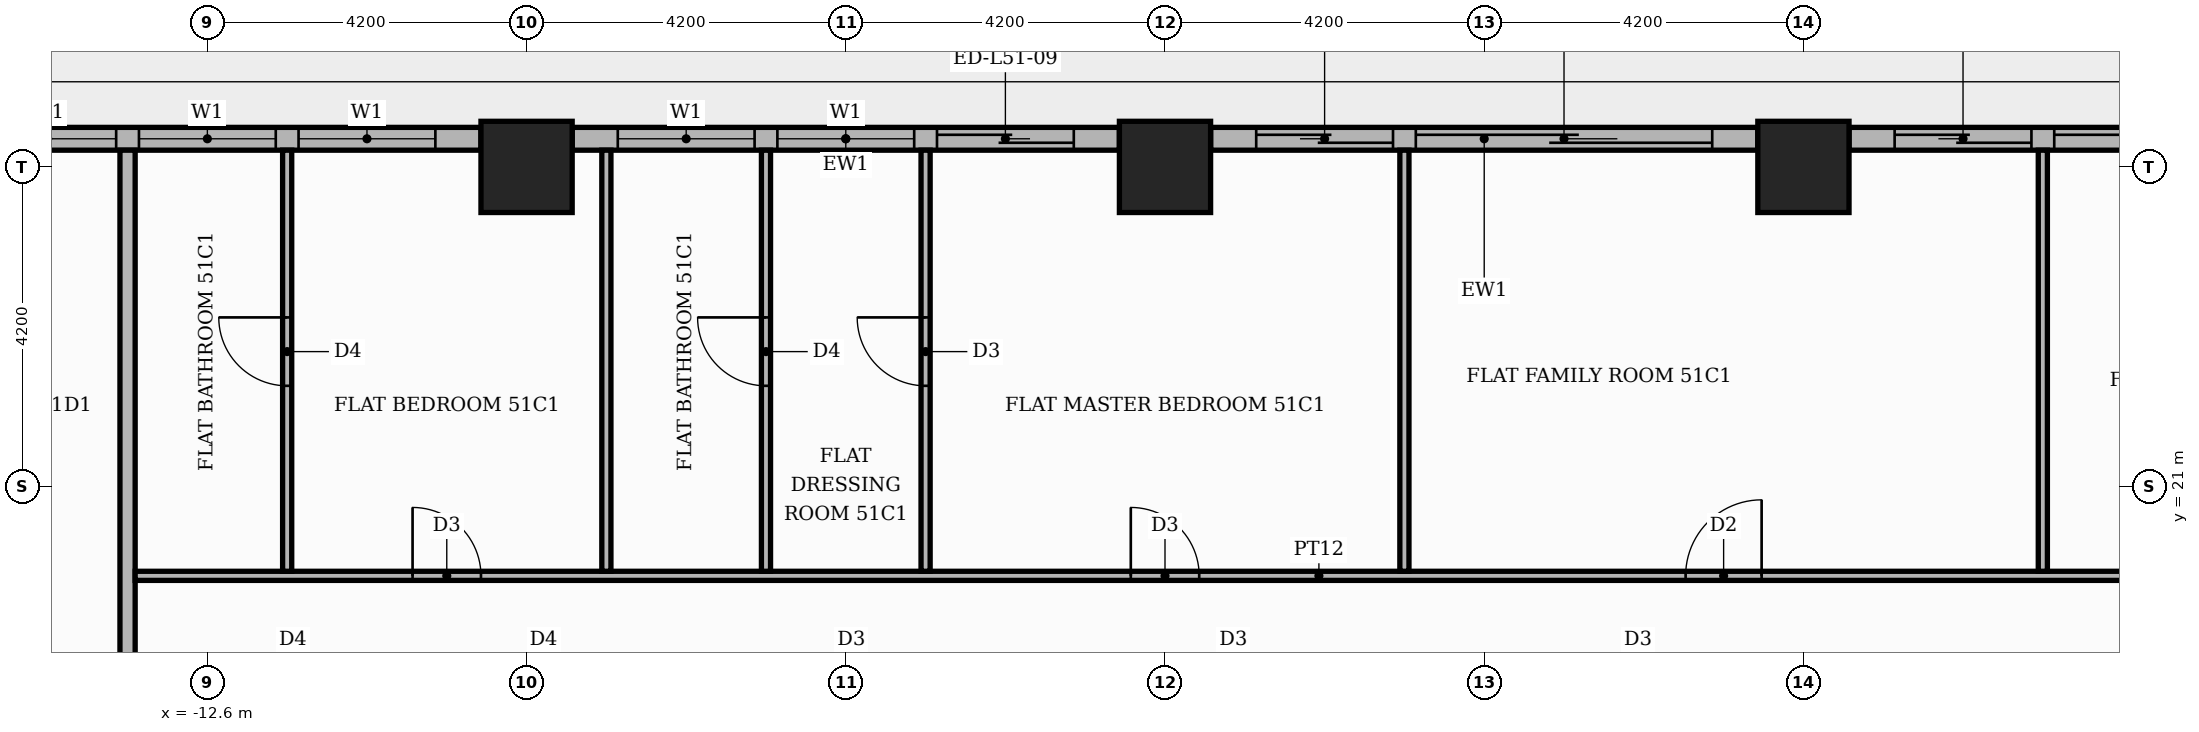
"""IFC4 building model, lengths in metres.
Left out: names, types, materials, properties, quantities, classifications, styles, units other than length and angle.
Written with IfcOpenShell. Run it as: python <this file> out.ifc"""

import sys

from ifc_helpers import new_model, si_unit, direction, frame, frame_2d, origin, origin_2d, place, context, subcontext, project, spatial, rectangle, extrude, element, fill, save


model = new_model("IFC4")
c1 = context("Model", 3, precision=1e-05, world=origin(), true_north=direction((0.0, 1.0)))
c2 = subcontext(c1, "Body", "Model", "MODEL_VIEW")
j1 = project(units=[si_unit("LENGTHUNIT", "METRE"), si_unit("PLANEANGLEUNIT", "RADIAN")], contexts=[c1])
p1 = place(None, origin())
s1 = spatial("IfcSite", under=j1, at=p1, CompositionType="ELEMENT")
p2 = place(p1, origin())
s2 = spatial("IfcBuilding", under=s1, at=p2, CompositionType="ELEMENT")
p3 = place(p2, frame((0.0, 0.0, 215.7)))
s3 = spatial("IfcBuildingStorey", under=s2, at=p3, CompositionType="ELEMENT", Elevation=215.7)
for number, where, z_axis, x_axis in (
    (1, (0.0, 25.2, 0.0), (0.0, 0.0, 1.0), (1.0, 0.0, 0.0)),
    (2, (-8.4, 25.2, 0.0), (0.0, 0.0, 1.0), (1.0, 0.0, 0.0)),
    (3, (8.4, 25.2, 0.0), (0.0, 0.0, 1.0), (1.0, 0.0, 0.0)),
):
    element("IfcColumn", number, at=place(p3, frame(where, z_axis=z_axis, x_axis=x_axis)), inside=s3, PredefinedType="COLUMN", context=c2, shape_type="SweptSolid", body=[
        extrude(rectangle(XDim=1.2, YDim=1.2, at=origin_2d()), origin(), (0.0, 0.0, 1.0), 3.9),
    ])
p4 = place(p3, frame((16.2, 25.57, 0.0), z_axis=(0.0, 0.0, 1.0), x_axis=(-1.0, 0.0, 0.0)))
e4 = element("IfcWall", 4, at=p4, inside=s3, PredefinedType="STANDARD", context=c2, shape_type="SweptSolid", body=[
    extrude(rectangle(XDim=7.2, YDim=0.3, at=frame_2d((3.6, 0.0))), origin(), (0.0, 0.0, 1.0), 3.48),
])
p5 = place(p4, frame((0.6, 0.0, 0.0)))
e5 = element("IfcOpeningElement", 5, at=p5, cuts=e4, PredefinedType="OPENING", context=c2, shape_type="SweptSolid", body=[
    extrude(rectangle(XDim=3.9, YDim=2.4, at=frame_2d((1.95, 1.2))), frame((0.0, 0.16, 0.0), z_axis=(0.0, -1.0, 0.0), x_axis=(1.0, 0.0, 0.0)), (0.0, 0.0, 1.0), 0.32),
])
p6 = place(p4, frame((4.8, 0.0, 0.0)))
e6 = element("IfcOpeningElement", 6, at=p6, cuts=e4, PredefinedType="OPENING", context=c2, shape_type="SweptSolid", body=[
    extrude(rectangle(XDim=1.8, YDim=2.4, at=frame_2d((0.9, 1.2))), frame((0.0, 0.16, 0.0), z_axis=(0.0, -1.0, 0.0), x_axis=(1.0, 0.0, 0.0)), (0.0, 0.0, 1.0), 0.32),
])
p7 = place(p3, frame((7.8, 25.57, 0.0), z_axis=(0.0, 0.0, 1.0), x_axis=(-1.0, 0.0, 0.0)))
e7 = element("IfcWall", 7, at=p7, inside=s3, PredefinedType="STANDARD", context=c2, shape_type="SweptSolid", body=[
    extrude(rectangle(XDim=7.2, YDim=0.3, at=frame_2d((3.6, 0.0))), origin(), (0.0, 0.0, 1.0), 3.48),
])
p8 = place(p7, frame((0.6, 0.0, 0.0)))
e8 = element("IfcOpeningElement", 8, at=p8, cuts=e7, PredefinedType="OPENING", context=c2, shape_type="SweptSolid", body=[
    extrude(rectangle(XDim=3.9, YDim=2.4, at=frame_2d((1.95, 1.2))), frame((0.0, 0.16, 0.0), z_axis=(0.0, -1.0, 0.0), x_axis=(1.0, 0.0, 0.0)), (0.0, 0.0, 1.0), 0.32),
])
p9 = place(p7, frame((4.8, 0.0, 0.0)))
e9 = element("IfcOpeningElement", 9, at=p9, cuts=e7, PredefinedType="OPENING", context=c2, shape_type="SweptSolid", body=[
    extrude(rectangle(XDim=1.8, YDim=2.4, at=frame_2d((0.9, 1.2))), frame((0.0, 0.16, 0.0), z_axis=(0.0, -1.0, 0.0), x_axis=(1.0, 0.0, 0.0)), (0.0, 0.0, 1.0), 0.32),
])
p10 = place(p3, frame((-0.6, 25.57, 0.0), z_axis=(0.0, 0.0, 1.0), x_axis=(-1.0, 0.0, 0.0)))
e10 = element("IfcWall", 10, at=p10, inside=s3, PredefinedType="STANDARD", context=c2, shape_type="SweptSolid", body=[
    extrude(rectangle(XDim=7.2, YDim=0.3, at=frame_2d((3.6, 0.0))), origin(), (0.0, 0.0, 1.0), 3.48),
])
p11 = place(p10, frame((0.6, 0.0, 0.0)))
e11 = element("IfcOpeningElement", 11, at=p11, cuts=e10, PredefinedType="OPENING", context=c2, shape_type="SweptSolid", body=[
    extrude(rectangle(XDim=1.8, YDim=2.4, at=frame_2d((0.9, 1.2))), frame((0.0, 0.16, 0.0), z_axis=(0.0, -1.0, 0.0), x_axis=(1.0, 0.0, 0.0)), (0.0, 0.0, 1.0), 0.32),
])
p12 = place(p10, frame((2.7, 0.0, 0.9)))
e12 = element("IfcOpeningElement", 12, at=p12, cuts=e10, PredefinedType="OPENING", context=c2, shape_type="SweptSolid", body=[
    extrude(rectangle(XDim=1.8, YDim=2.1, at=frame_2d((0.9, 1.05))), frame((0.0, 0.16, 0.0), z_axis=(0.0, -1.0, 0.0), x_axis=(1.0, 0.0, 0.0)), (0.0, 0.0, 1.0), 0.32),
])
p13 = place(p10, frame((4.8, 0.0, 0.9)))
e13 = element("IfcOpeningElement", 13, at=p13, cuts=e10, PredefinedType="OPENING", context=c2, shape_type="SweptSolid", body=[
    extrude(rectangle(XDim=1.8, YDim=2.1, at=frame_2d((0.9, 1.05))), frame((0.0, 0.16, 0.0), z_axis=(0.0, -1.0, 0.0), x_axis=(1.0, 0.0, 0.0)), (0.0, 0.0, 1.0), 0.32),
])
p14 = place(p3, frame((-9.0, 25.57, 0.0), z_axis=(0.0, 0.0, 1.0), x_axis=(-1.0, 0.0, 0.0)))
e14 = element("IfcWall", 14, at=p14, inside=s3, PredefinedType="STANDARD", context=c2, shape_type="SweptSolid", body=[
    extrude(rectangle(XDim=7.2, YDim=0.3, at=frame_2d((3.6, 0.0))), origin(), (0.0, 0.0, 1.0), 3.48),
])
p15 = place(p14, frame((0.6, 0.0, 0.9)))
e15 = element("IfcOpeningElement", 15, at=p15, cuts=e14, PredefinedType="OPENING", context=c2, shape_type="SweptSolid", body=[
    extrude(rectangle(XDim=1.8, YDim=2.1, at=frame_2d((0.9, 1.05))), frame((0.0, 0.16, 0.0), z_axis=(0.0, -1.0, 0.0), x_axis=(1.0, 0.0, 0.0)), (0.0, 0.0, 1.0), 0.32),
])
p16 = place(p14, frame((2.7, 0.0, 0.9)))
e16 = element("IfcOpeningElement", 16, at=p16, cuts=e14, PredefinedType="OPENING", context=c2, shape_type="SweptSolid", body=[
    extrude(rectangle(XDim=1.8, YDim=2.1, at=frame_2d((0.9, 1.05))), frame((0.0, 0.16, 0.0), z_axis=(0.0, -1.0, 0.0), x_axis=(1.0, 0.0, 0.0)), (0.0, 0.0, 1.0), 0.32),
])
p17 = place(p14, frame((4.8, 0.0, 0.9)))
e17 = element("IfcOpeningElement", 17, at=p17, cuts=e14, PredefinedType="OPENING", context=c2, shape_type="SweptSolid", body=[
    extrude(rectangle(XDim=1.8, YDim=2.1, at=frame_2d((0.9, 1.05))), frame((0.0, 0.16, 0.0), z_axis=(0.0, -1.0, 0.0), x_axis=(1.0, 0.0, 0.0)), (0.0, 0.0, 1.0), 0.32),
])
p18 = place(p3, frame((-13.65, 13.75, 0.0), z_axis=(0.0, 0.0, 1.0), x_axis=(0.0, 1.0, 0.0)))
e18 = element("IfcWall", 18, at=p18, inside=s3, PredefinedType="PARTITIONING", context=c2, shape_type="SweptSolid", body=[
    extrude(rectangle(XDim=11.67, YDim=0.2, at=frame_2d((5.835, 0.0))), origin(), (0.0, 0.0, 1.0), 3.48),
])
p19 = place(p3, frame((-13.55, 19.82, 0.0), z_axis=(0.0, 0.0, 1.0), x_axis=(1.0, 0.0, 0.0)))
e19 = element("IfcWall", 19, at=p19, inside=s3, PredefinedType="PARTITIONING", context=c2, shape_type="SweptSolid", body=[
    extrude(rectangle(XDim=31.15, YDim=0.12, at=frame_2d((15.575, 0.0))), origin(), (0.0, 0.0, 1.0), 3.48),
])
p20 = place(p19, frame((26.7, 0.0, 0.0)))
e20 = element("IfcOpeningElement", 20, at=p20, cuts=e19, PredefinedType="OPENING", context=c2, shape_type="SweptSolid", body=[
    extrude(rectangle(XDim=1.0, YDim=2.1, at=frame_2d((0.5, 1.05))), frame((0.0, 0.07, 0.0), z_axis=(0.0, -1.0, 0.0), x_axis=(1.0, 0.0, 0.0)), (0.0, 0.0, 1.0), 0.14),
])
p21 = place(p19, frame((20.4, 0.0, 0.0)))
e21 = element("IfcOpeningElement", 21, at=p21, cuts=e19, PredefinedType="OPENING", context=c2, shape_type="SweptSolid", body=[
    extrude(rectangle(XDim=1.0, YDim=2.1, at=frame_2d((0.5, 1.05))), frame((0.0, 0.07, 0.0), z_axis=(0.0, -1.0, 0.0), x_axis=(1.0, 0.0, 0.0)), (0.0, 0.0, 1.0), 0.14),
])
p22 = place(p19, frame((13.1, 0.0, 0.0)))
e22 = element("IfcOpeningElement", 22, at=p22, cuts=e19, PredefinedType="OPENING", context=c2, shape_type="SweptSolid", body=[
    extrude(rectangle(XDim=0.9, YDim=2.1, at=frame_2d((0.45, 1.05))), frame((0.0, 0.07, 0.0), z_axis=(0.0, -1.0, 0.0), x_axis=(1.0, 0.0, 0.0)), (0.0, 0.0, 1.0), 0.14),
])
p23 = place(p19, frame((3.65, 0.0, 0.0)))
e23 = element("IfcOpeningElement", 23, at=p23, cuts=e19, PredefinedType="OPENING", context=c2, shape_type="SweptSolid", body=[
    extrude(rectangle(XDim=0.9, YDim=2.1, at=frame_2d((0.45, 1.05))), frame((0.0, 0.07, 0.0), z_axis=(0.0, -1.0, 0.0), x_axis=(1.0, 0.0, 0.0)), (0.0, 0.0, 1.0), 0.14),
])
p24 = place(p3, frame((-11.55, 19.88, 0.0), z_axis=(0.0, 0.0, 1.0), x_axis=(0.0, 1.0, 0.0)))
e24 = element("IfcWall", 24, at=p24, inside=s3, PredefinedType="PARTITIONING", context=c2, shape_type="SweptSolid", body=[
    extrude(rectangle(XDim=5.54, YDim=0.12, at=frame_2d((2.77, 0.0))), origin(), (0.0, 0.0, 1.0), 3.48),
])
p25 = place(p24, frame((2.44, 0.0, 0.0)))
e25 = element("IfcOpeningElement", 25, at=p25, cuts=e24, PredefinedType="OPENING", context=c2, shape_type="SweptSolid", body=[
    extrude(rectangle(XDim=0.9, YDim=2.1, at=frame_2d((0.45, 1.05))), frame((0.0, 0.07, 0.0), z_axis=(0.0, -1.0, 0.0), x_axis=(1.0, 0.0, 0.0)), (0.0, 0.0, 1.0), 0.14),
])
p26 = place(p3, frame((-7.35, 19.88, 0.0), z_axis=(0.0, 0.0, 1.0), x_axis=(0.0, 1.0, 0.0)))
e26 = element("IfcWall", 26, at=p26, inside=s3, PredefinedType="PARTITIONING", context=c2, shape_type="SweptSolid", body=[
    extrude(rectangle(XDim=5.54, YDim=0.12, at=frame_2d((2.77, 0.0))), origin(), (0.0, 0.0, 1.0), 3.48),
])
p27 = place(p3, frame((-5.25, 19.88, 0.0), z_axis=(0.0, 0.0, 1.0), x_axis=(0.0, 1.0, 0.0)))
e27 = element("IfcWall", 27, at=p27, inside=s3, PredefinedType="PARTITIONING", context=c2, shape_type="SweptSolid", body=[
    extrude(rectangle(XDim=5.54, YDim=0.12, at=frame_2d((2.77, 0.0))), origin(), (0.0, 0.0, 1.0), 3.48),
])
p28 = place(p27, frame((2.44, 0.0, 0.0)))
e28 = element("IfcOpeningElement", 28, at=p28, cuts=e27, PredefinedType="OPENING", context=c2, shape_type="SweptSolid", body=[
    extrude(rectangle(XDim=0.9, YDim=2.1, at=frame_2d((0.45, 1.05))), frame((0.0, 0.07, 0.0), z_axis=(0.0, -1.0, 0.0), x_axis=(1.0, 0.0, 0.0)), (0.0, 0.0, 1.0), 0.14),
])
p29 = place(p3, frame((-3.15, 19.88, 0.0), z_axis=(0.0, 0.0, 1.0), x_axis=(0.0, 1.0, 0.0)))
e29 = element("IfcWall", 29, at=p29, inside=s3, PredefinedType="PARTITIONING", context=c2, shape_type="SweptSolid", body=[
    extrude(rectangle(XDim=5.54, YDim=0.12, at=frame_2d((2.77, 0.0))), origin(), (0.0, 0.0, 1.0), 3.48),
])
p30 = place(p29, frame((2.44, 0.0, 0.0)))
e30 = element("IfcOpeningElement", 30, at=p30, cuts=e29, PredefinedType="OPENING", context=c2, shape_type="SweptSolid", body=[
    extrude(rectangle(XDim=0.9, YDim=2.1, at=frame_2d((0.45, 1.05))), frame((0.0, 0.07, 0.0), z_axis=(0.0, -1.0, 0.0), x_axis=(1.0, 0.0, 0.0)), (0.0, 0.0, 1.0), 0.14),
])
for number, where, z_axis, x_axis in (
    (31, (3.15, 19.88, 0.0), (0.0, 0.0, 1.0), (0.0, 1.0, 0.0)),
    (32, (11.55, 19.88, 0.0), (0.0, 0.0, 1.0), (0.0, 1.0, 0.0)),
):
    element("IfcWall", number, at=place(p3, frame(where, z_axis=z_axis, x_axis=x_axis)), inside=s3, PredefinedType="PARTITIONING", context=c2, shape_type="SweptSolid", body=[
        extrude(rectangle(XDim=5.54, YDim=0.12, at=frame_2d((2.77, 0.0))), origin(), (0.0, 0.0, 1.0), 3.48),
    ])
p31 = place(p5, origin())
e33 = element("IfcDoor", 33, at=p31, inside=s3, OperationType="SLIDING_TO_LEFT", PredefinedType="DOOR", context=c2, shape_type="SweptSolid", body=[
    extrude(rectangle(XDim=3.9, YDim=2.4, at=frame_2d((1.95, 1.2))), frame((0.0, 0.025, 0.0), z_axis=(0.0, -1.0, 0.0), x_axis=(1.0, 0.0, 0.0)), (0.0, 0.0, 1.0), 0.05),
])
fill(e5, e33)
p32 = place(p6, origin())
e34 = element("IfcDoor", 34, at=p32, inside=s3, OperationType="SLIDING_TO_RIGHT", PredefinedType="DOOR", context=c2, shape_type="SweptSolid", body=[
    extrude(rectangle(XDim=1.8, YDim=2.4, at=frame_2d((0.9, 1.2))), frame((0.0, 0.025, 0.0), z_axis=(0.0, -1.0, 0.0), x_axis=(1.0, 0.0, 0.0)), (0.0, 0.0, 1.0), 0.05),
])
fill(e6, e34)
p33 = place(p8, origin())
e35 = element("IfcDoor", 35, at=p33, inside=s3, OperationType="SLIDING_TO_LEFT", PredefinedType="DOOR", context=c2, shape_type="SweptSolid", body=[
    extrude(rectangle(XDim=3.9, YDim=2.4, at=frame_2d((1.95, 1.2))), frame((0.0, 0.025, 0.0), z_axis=(0.0, -1.0, 0.0), x_axis=(1.0, 0.0, 0.0)), (0.0, 0.0, 1.0), 0.05),
])
fill(e8, e35)
p34 = place(p9, origin())
e36 = element("IfcDoor", 36, at=p34, inside=s3, OperationType="SLIDING_TO_RIGHT", PredefinedType="DOOR", context=c2, shape_type="SweptSolid", body=[
    extrude(rectangle(XDim=1.8, YDim=2.4, at=frame_2d((0.9, 1.2))), frame((0.0, 0.025, 0.0), z_axis=(0.0, -1.0, 0.0), x_axis=(1.0, 0.0, 0.0)), (0.0, 0.0, 1.0), 0.05),
])
fill(e9, e36)
p35 = place(p11, origin())
e37 = element("IfcDoor", 37, at=p35, inside=s3, OperationType="SLIDING_TO_LEFT", PredefinedType="DOOR", context=c2, shape_type="SweptSolid", body=[
    extrude(rectangle(XDim=1.8, YDim=2.4, at=frame_2d((0.9, 1.2))), frame((0.0, 0.025, 0.0), z_axis=(0.0, -1.0, 0.0), x_axis=(1.0, 0.0, 0.0)), (0.0, 0.0, 1.0), 0.05),
])
fill(e11, e37)
p36 = place(p12, origin())
e38 = element("IfcWindow", 38, at=p36, inside=s3, PartitioningType="SINGLE_PANEL", PredefinedType="WINDOW", context=c2, shape_type="SweptSolid", body=[
    extrude(rectangle(XDim=1.8, YDim=2.1, at=frame_2d((0.9, 1.05))), frame((0.0, 0.03, 0.0), z_axis=(0.0, -1.0, 0.0), x_axis=(1.0, 0.0, 0.0)), (0.0, 0.0, 1.0), 0.06),
])
fill(e12, e38)
p37 = place(p13, origin())
e39 = element("IfcWindow", 39, at=p37, inside=s3, PartitioningType="SINGLE_PANEL", PredefinedType="WINDOW", context=c2, shape_type="SweptSolid", body=[
    extrude(rectangle(XDim=1.8, YDim=2.1, at=frame_2d((0.9, 1.05))), frame((0.0, 0.03, 0.0), z_axis=(0.0, -1.0, 0.0), x_axis=(1.0, 0.0, 0.0)), (0.0, 0.0, 1.0), 0.06),
])
fill(e13, e39)
p38 = place(p15, origin())
e40 = element("IfcWindow", 40, at=p38, inside=s3, PartitioningType="SINGLE_PANEL", PredefinedType="WINDOW", context=c2, shape_type="SweptSolid", body=[
    extrude(rectangle(XDim=1.8, YDim=2.1, at=frame_2d((0.9, 1.05))), frame((0.0, 0.03, 0.0), z_axis=(0.0, -1.0, 0.0), x_axis=(1.0, 0.0, 0.0)), (0.0, 0.0, 1.0), 0.06),
])
fill(e15, e40)
p39 = place(p16, origin())
e41 = element("IfcWindow", 41, at=p39, inside=s3, PartitioningType="SINGLE_PANEL", PredefinedType="WINDOW", context=c2, shape_type="SweptSolid", body=[
    extrude(rectangle(XDim=1.8, YDim=2.1, at=frame_2d((0.9, 1.05))), frame((0.0, 0.03, 0.0), z_axis=(0.0, -1.0, 0.0), x_axis=(1.0, 0.0, 0.0)), (0.0, 0.0, 1.0), 0.06),
])
fill(e16, e41)
p40 = place(p17, origin())
e42 = element("IfcWindow", 42, at=p40, inside=s3, PartitioningType="SINGLE_PANEL", PredefinedType="WINDOW", context=c2, shape_type="SweptSolid", body=[
    extrude(rectangle(XDim=1.8, YDim=2.1, at=frame_2d((0.9, 1.05))), frame((0.0, 0.03, 0.0), z_axis=(0.0, -1.0, 0.0), x_axis=(1.0, 0.0, 0.0)), (0.0, 0.0, 1.0), 0.06),
])
fill(e17, e42)
p41 = place(p21, origin())
e43 = element("IfcDoor", 43, at=p41, inside=s3, OperationType="SINGLE_SWING_RIGHT", PredefinedType="DOOR", context=c2, shape_type="SweptSolid", body=[
    extrude(rectangle(XDim=1.0, YDim=2.1, at=frame_2d((0.5, 1.05))), frame((0.0, 0.025, 0.0), z_axis=(0.0, -1.0, 0.0), x_axis=(1.0, 0.0, 0.0)), (0.0, 0.0, 1.0), 0.05),
])
fill(e21, e43)
p42 = place(p22, origin())
e44 = element("IfcDoor", 44, at=p42, inside=s3, OperationType="SINGLE_SWING_LEFT", PredefinedType="DOOR", context=c2, shape_type="SweptSolid", body=[
    extrude(rectangle(XDim=0.9, YDim=2.1, at=frame_2d((0.45, 1.05))), frame((0.0, 0.025, 0.0), z_axis=(0.0, -1.0, 0.0), x_axis=(1.0, 0.0, 0.0)), (0.0, 0.0, 1.0), 0.05),
])
fill(e22, e44)
p43 = place(p30, origin())
e45 = element("IfcDoor", 45, at=p43, inside=s3, OperationType="SINGLE_SWING_RIGHT", PredefinedType="DOOR", context=c2, shape_type="SweptSolid", body=[
    extrude(rectangle(XDim=0.9, YDim=2.1, at=frame_2d((0.45, 1.05))), frame((0.0, 0.025, 0.0), z_axis=(0.0, -1.0, 0.0), x_axis=(1.0, 0.0, 0.0)), (0.0, 0.0, 1.0), 0.05),
])
fill(e30, e45)
p44 = place(p28, origin())
e46 = element("IfcDoor", 46, at=p44, inside=s3, OperationType="SINGLE_SWING_RIGHT", PredefinedType="DOOR", context=c2, shape_type="SweptSolid", body=[
    extrude(rectangle(XDim=0.9, YDim=2.1, at=frame_2d((0.45, 1.05))), frame((0.0, 0.025, 0.0), z_axis=(0.0, -1.0, 0.0), x_axis=(1.0, 0.0, 0.0)), (0.0, 0.0, 1.0), 0.05),
])
fill(e28, e46)
p45 = place(p23, origin())
e47 = element("IfcDoor", 47, at=p45, inside=s3, OperationType="SINGLE_SWING_LEFT", PredefinedType="DOOR", context=c2, shape_type="SweptSolid", body=[
    extrude(rectangle(XDim=0.9, YDim=2.1, at=frame_2d((0.45, 1.05))), frame((0.0, 0.025, 0.0), z_axis=(0.0, -1.0, 0.0), x_axis=(1.0, 0.0, 0.0)), (0.0, 0.0, 1.0), 0.05),
])
fill(e23, e47)
p46 = place(p25, origin())
e48 = element("IfcDoor", 48, at=p46, inside=s3, OperationType="SINGLE_SWING_RIGHT", PredefinedType="DOOR", context=c2, shape_type="SweptSolid", body=[
    extrude(rectangle(XDim=0.9, YDim=2.1, at=frame_2d((0.45, 1.05))), frame((0.0, 0.025, 0.0), z_axis=(0.0, -1.0, 0.0), x_axis=(1.0, 0.0, 0.0)), (0.0, 0.0, 1.0), 0.05),
])
fill(e25, e48)
save(model, sys.argv[1])
